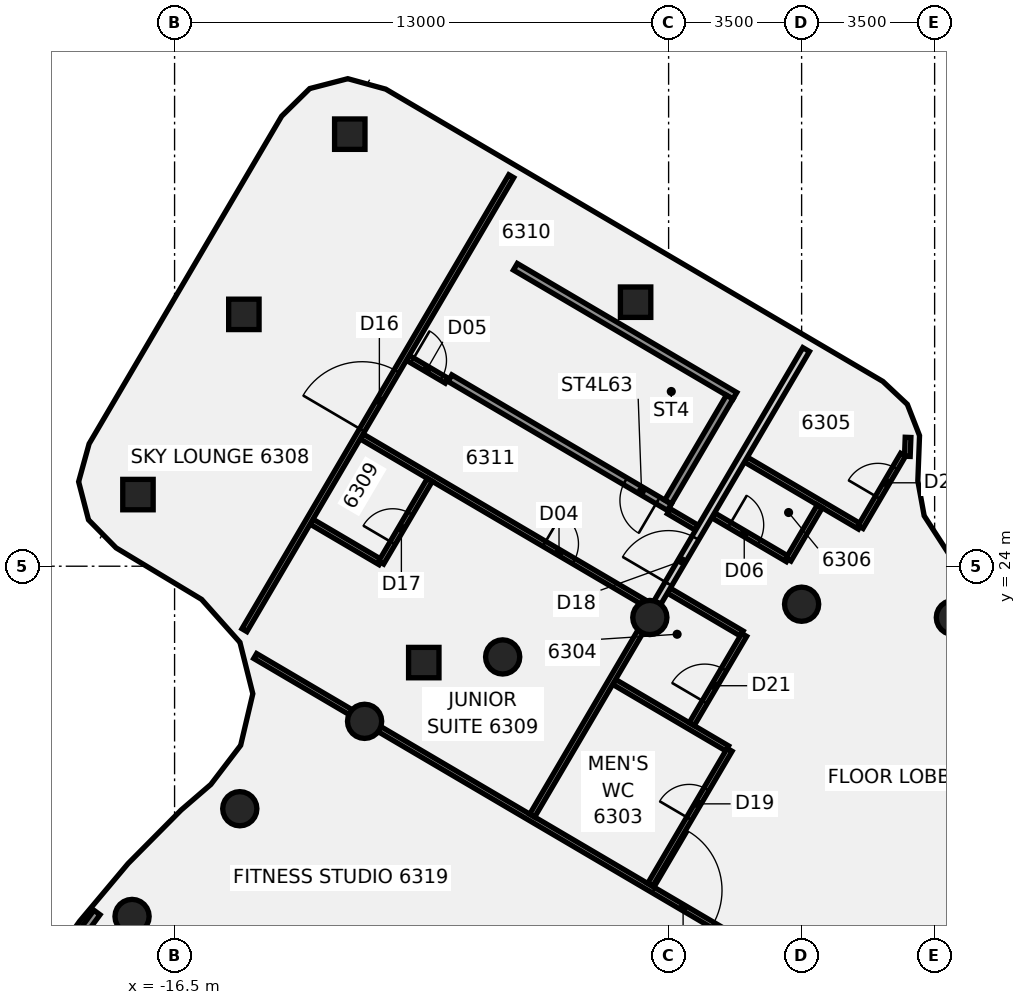
"""IFC4 building model, lengths in metres.
Left out: names, types, materials, properties, quantities, classifications, styles, units other than length and angle.
Written with IfcOpenShell. Run it as: python <this file> out.ifc"""

import sys

from ifc_helpers import new_model, si_unit, direction, frame, frame_2d, origin, origin_2d, place, context, subcontext, project, spatial, polyline, rectangle, circle, outline, extrude, element, fill, save


model = new_model("IFC4")
c1 = context("Model", 3, precision=1e-05, world=origin(), true_north=direction((0.0, 1.0)))
c2 = subcontext(c1, "Body", "Model", "MODEL_VIEW")
j1 = project(units=[si_unit("LENGTHUNIT", "METRE"), si_unit("PLANEANGLEUNIT", "RADIAN")], contexts=[c1])
p1 = place(None, origin())
s1 = spatial("IfcSite", under=j1, at=p1, CompositionType="ELEMENT")
p2 = place(p1, origin())
s2 = spatial("IfcBuilding", under=s1, at=p2, CompositionType="ELEMENT")
p3 = place(p2, frame((0.0, 0.0, 248.7)))
s3 = spatial("IfcBuildingStorey", under=s2, at=p3, CompositionType="ELEMENT", Elevation=248.7)
for number, where, z_axis, x_axis in (
    (1, (3.994, 22.651, -0.14), (0.0, 0.0, 1.0), (1.0, 0.0, 0.0)),
    (2, (0.0, 23.0, -0.14), (0.0, 0.0, 1.0), (1.0, 0.0, 0.0)),
    (3, (-3.994, 22.651, -0.14), (0.0, 0.0, 1.0), (1.0, 0.0, 0.0)),
    (4, (-7.866, 21.613, -0.14), (0.0, 0.0, 1.0), (1.0, 0.0, 0.0)),
    (5, (-11.5, 19.919, -0.14), (0.0, 0.0, 1.0), (1.0, 0.0, 0.0)),
    (6, (-14.784, 17.619, -0.14), (0.0, 0.0, 1.0), (1.0, 0.0, 0.0)),
    (7, (-17.619, 14.784, -0.14), (0.0, 0.0, 1.0), (1.0, 0.0, 0.0)),
):
    element("IfcColumn", number, at=place(p3, frame(where, z_axis=z_axis, x_axis=x_axis)), inside=s3, PredefinedType="COLUMN", context=c2, shape_type="SweptSolid", body=[
        extrude(circle(Radius=0.45, at=origin_2d()), origin(), (0.0, 0.0, 1.0), 3.56),
    ])
for number, where, z_axis, x_axis in (
    (8, (-9.942, 21.464, -0.139), (0.003, -0.051, 0.999), (0.508, 0.861, 0.042)),
    (9, (-4.368, 30.948, -0.139), (-0.046, -0.023, 0.999), (0.861, -0.507, 0.028)),
):
    element("IfcColumn", number, at=place(p3, frame(where, z_axis=z_axis, x_axis=x_axis)), inside=s3, PredefinedType="COLUMN", context=c2, shape_type="SweptSolid", body=[
        extrude(rectangle(XDim=0.8, YDim=0.8, at=origin_2d()), origin(), (0.0, 0.0, 1.0), 3.559),
    ])
p4 = place(p3, frame((-11.89, 35.368, -0.138), z_axis=(0.020708969994, -0.110857918581, 0.993620481094), x_axis=(0.507479159503, 0.857452499838, 0.085088854685)))
e10 = element("IfcColumn", 10, at=p4, inside=s3, PredefinedType="COLUMN", context=c2, shape_type="SweptSolid", body=[
    extrude(rectangle(XDim=0.8, YDim=0.8, at=origin_2d()), origin(), (0.0, 0.0, 1.0), 3.572),
])
p5 = place(p3, frame((-14.677, 30.626, -0.138), z_axis=(0.044850513994, -0.124463584428, 0.991209991649), x_axis=(0.5085121785, 0.856889853507, 0.084588079979)))
e11 = element("IfcColumn", 11, at=p5, inside=s3, PredefinedType="COLUMN", context=c2, shape_type="SweptSolid", body=[
    extrude(rectangle(XDim=0.8, YDim=0.8, at=origin_2d()), origin(), (0.0, 0.0, 1.0), 3.582),
])
p6 = place(p3, frame((-17.464, 25.885, -0.137), z_axis=(0.068808591822, -0.137956811442, 0.988045189183), x_axis=(0.509660839858, 0.85625889674, 0.08406265561)))
e12 = element("IfcColumn", 12, at=p6, inside=s3, PredefinedType="COLUMN", context=c2, shape_type="SweptSolid", body=[
    extrude(rectangle(XDim=0.8, YDim=0.8, at=origin_2d()), origin(), (0.0, 0.0, 1.0), 3.594),
])
p7 = place(p3, frame((-14.379, 21.637, 0.0), z_axis=(0.0, 0.0, 1.0), x_axis=(0.862098659061, -0.506740468134, 0.0)))
e13 = element("IfcWall", 13, at=p7, inside=s3, PredefinedType="PARTITIONING", context=c2, shape_type="SweptSolid", body=[
    extrude(rectangle(XDim=3.129, YDim=0.15, at=frame_2d((1.564, 0.0))), origin(), (0.0, 0.0, 1.0), 2.824),
])
p8 = place(p3, frame((-11.294, 19.823, 0.0), z_axis=(0.0, 0.0, 1.0), x_axis=(0.862088271049, -0.506758140457, 0.0)))
e14 = element("IfcWall", 14, at=p8, inside=s3, PredefinedType="PARTITIONING", context=c2, shape_type="SweptSolid", body=[
    extrude(rectangle(XDim=15.396, YDim=0.15, at=frame_2d((7.698, 0.0))), origin(), (0.0, 0.0, 1.0), 2.824),
])
p9 = place(p8, frame((8.583, 0.0, 0.0)))
e15 = element("IfcOpeningElement", 15, at=p9, cuts=e14, PredefinedType="OPENING", context=c2, shape_type="SweptSolid", body=[
    extrude(rectangle(XDim=1.8, YDim=2.1, at=frame_2d((0.9, 1.05))), frame((0.0, 0.085, 0.0), z_axis=(0.0, -1.0, 0.0), x_axis=(1.0, 0.0, 0.0)), (0.0, 0.0, 1.0), 0.17),
])
p10 = place(p3, frame((-12.896, 25.172, 0.0), z_axis=(0.0, 0.0, 1.0), x_axis=(0.862032569566, -0.506852886948, 0.0)))
e16 = element("IfcWall", 16, at=p10, inside=s3, PredefinedType="PARTITIONING", context=c2, shape_type="SweptSolid", body=[
    extrude(rectangle(XDim=2.105, YDim=0.15, at=frame_2d((1.053, 0.0))), origin(), (0.0, 0.0, 1.0), 2.824),
])
p11 = place(p3, frame((-11.578, 27.414, 0.0), z_axis=(0.0, 0.0, 1.0), x_axis=(0.862113201937, -0.50671572607, 0.0)))
e17 = element("IfcWall", 17, at=p11, inside=s3, PredefinedType="PARTITIONING", context=c2, shape_type="SweptSolid", body=[
    extrude(rectangle(XDim=8.588, YDim=0.15, at=frame_2d((4.294, 0.0))), origin(), (0.0, 0.0, 1.0), 2.82),
])
p12 = place(p11, frame((5.575, 0.0, 0.0)))
e18 = element("IfcOpeningElement", 18, at=p12, cuts=e17, PredefinedType="OPENING", context=c2, shape_type="SweptSolid", body=[
    extrude(rectangle(XDim=0.9, YDim=2.1, at=frame_2d((0.45, 1.05))), frame((0.0, 0.085, 0.0), z_axis=(0.0, -1.0, 0.0), x_axis=(1.0, 0.0, 0.0)), (0.0, 0.0, 1.0), 0.17),
])
p13 = place(p3, frame((-10.362, 29.483, 0.0), z_axis=(0.0, 0.0, 1.0), x_axis=(0.862071765069, -0.506786219102, 0.0)))
e19 = element("IfcWall", 19, at=p13, inside=s3, PredefinedType="PARTITIONING", context=c2, shape_type="SweptSolid", body=[
    extrude(rectangle(XDim=1.186, YDim=0.15, at=frame_2d((0.593, 0.0))), origin(), (0.0, 0.0, 1.0), 2.824),
])
p14 = place(p13, frame((0.136, 0.0, 0.0)))
e20 = element("IfcOpeningElement", 20, at=p14, cuts=e19, PredefinedType="OPENING", context=c2, shape_type="SweptSolid", body=[
    extrude(rectangle(XDim=0.9, YDim=2.1, at=frame_2d((0.45, 1.05))), frame((0.0, 0.085, 0.0), z_axis=(0.0, -1.0, 0.0), x_axis=(1.0, 0.0, 0.0)), (0.0, 0.0, 1.0), 0.17),
])
p15 = place(p3, frame((-3.496, 25.447, 0.0), z_axis=(0.0, 0.0, 1.0), x_axis=(0.862116595813, -0.50670995177, 0.0)))
e21 = element("IfcWall", 21, at=p15, inside=s3, PredefinedType="PARTITIONING", context=c2, shape_type="SweptSolid", body=[
    extrude(rectangle(XDim=0.86, YDim=0.15, at=frame_2d((0.43, 0.0))), origin(), (0.0, 0.0, 1.0), 2.824),
])
p16 = place(p3, frame((-4.934, 20.956, 0.0), z_axis=(0.0, 0.0, 1.0), x_axis=(0.862152421238, -0.506648993439, 0.0)))
e22 = element("IfcWall", 22, at=p16, inside=s3, PredefinedType="PARTITIONING", context=c2, shape_type="SweptSolid", body=[
    extrude(rectangle(XDim=3.45, YDim=0.15, at=frame_2d((1.725, 0.0))), origin(), (0.0, 0.0, 1.0), 2.824),
])
p17 = place(p3, frame((-3.494, 23.357, 0.0), z_axis=(0.0, 0.0, 1.0), x_axis=(0.862114686067, -0.506713201, 0.0)))
e23 = element("IfcWall", 23, at=p17, inside=s3, PredefinedType="PARTITIONING", context=c2, shape_type="SweptSolid", body=[
    extrude(rectangle(XDim=2.225, YDim=0.15, at=frame_2d((1.113, 0.0))), origin(), (0.0, 0.0, 1.0), 2.824),
])
p18 = place(p3, frame((-2.329, 25.34, 0.0), z_axis=(0.0, 0.0, 1.0), x_axis=(0.862115841081, -0.506711235871, 0.0)))
e24 = element("IfcWall", 24, at=p18, inside=s3, PredefinedType="PARTITIONING", context=c2, shape_type="SweptSolid", body=[
    extrude(rectangle(XDim=2.28, YDim=0.15, at=frame_2d((1.14, 0.0))), origin(), (0.0, 0.0, 1.0), 2.824),
])
p19 = place(p18, frame((0.5, 0.0, 0.0)))
e25 = element("IfcOpeningElement", 25, at=p19, cuts=e24, PredefinedType="OPENING", context=c2, shape_type="SweptSolid", body=[
    extrude(rectangle(XDim=0.9, YDim=2.1, at=frame_2d((0.45, 1.05))), frame((0.0, 0.085, 0.0), z_axis=(0.0, -1.0, 0.0), x_axis=(1.0, 0.0, 0.0)), (0.0, 0.0, 1.0), 0.17),
])
p20 = place(p3, frame((-1.467, 26.806, 0.0), z_axis=(0.0, 0.0, 1.0), x_axis=(0.861936018647, -0.507017060619, 0.0)))
e26 = element("IfcWall", 26, at=p20, inside=s3, PredefinedType="PARTITIONING", context=c2, shape_type="SweptSolid", body=[
    extrude(rectangle(XDim=3.48, YDim=0.15, at=frame_2d((1.74, 0.0))), origin(), (0.0, 0.0, 1.0), 2.824),
])
p21 = place(p3, frame((-14.662, 22.317, 0.0), z_axis=(0.0, 0.0, 1.0), x_axis=(0.506732099473, 0.862103578094, 0.0)))
e27 = element("IfcWall", 27, at=p21, inside=s3, PredefinedType="PARTITIONING", context=c2, shape_type="SweptSolid", body=[
    extrude(rectangle(XDim=13.855, YDim=0.15, at=frame_2d((6.928, 0.0))), origin(), (0.0, 0.0, 1.0), 2.82),
])
p22 = place(p21, frame((6.107, 0.0, 0.0)))
e28 = element("IfcOpeningElement", 28, at=p22, cuts=e27, PredefinedType="OPENING", context=c2, shape_type="SweptSolid", body=[
    extrude(rectangle(XDim=1.8, YDim=2.1, at=frame_2d((0.9, 1.05))), frame((0.0, 0.085, 0.0), z_axis=(0.0, -1.0, 0.0), x_axis=(1.0, 0.0, 0.0)), (0.0, 0.0, 1.0), 0.17),
])
p23 = place(p3, frame((-11.064, 24.095, 0.0), z_axis=(0.0, 0.0, 1.0), x_axis=(0.506813115259, 0.862055953057, 0.0)))
e29 = element("IfcWall", 29, at=p23, inside=s3, PredefinedType="PARTITIONING", context=c2, shape_type="SweptSolid", body=[
    extrude(rectangle(XDim=2.526, YDim=0.15, at=frame_2d((1.263, 0.0))), origin(), (0.0, 0.0, 1.0), 2.824),
])
p24 = place(p23, frame((0.6, 0.0, 0.0)))
e30 = element("IfcOpeningElement", 30, at=p24, cuts=e29, PredefinedType="OPENING", context=c2, shape_type="SweptSolid", body=[
    extrude(rectangle(XDim=0.9, YDim=2.1, at=frame_2d((0.45, 1.05))), frame((0.0, 0.085, 0.0), z_axis=(0.0, -1.0, 0.0), x_axis=(1.0, 0.0, 0.0)), (0.0, 0.0, 1.0), 0.17),
])
p25 = place(p3, frame((-7.089, 17.439, 0.0), z_axis=(0.0, 0.0, 1.0), x_axis=(0.506780667638, 0.862075028584, 0.0)))
e31 = element("IfcWall", 31, at=p25, inside=s3, PredefinedType="PARTITIONING", context=c2, shape_type="SweptSolid", body=[
    extrude(rectangle(XDim=5.837, YDim=0.15, at=frame_2d((2.919, 0.0))), origin(), (0.0, 0.0, 1.0), 2.824),
])
p26 = place(p3, frame((-3.903, 22.859, 0.0), z_axis=(0.0, 0.0, 1.0), x_axis=(0.506788872143, 0.862070205419, 0.0)))
e32 = element("IfcWall", 32, at=p26, inside=s3, PredefinedType="PARTITIONING", context=c2, shape_type="SweptSolid", body=[
    extrude(rectangle(XDim=7.936, YDim=0.2, at=frame_2d((3.968, 0.0))), origin(), (0.0, 0.0, 1.0), 2.82),
])
p27 = place(p26, frame((0.787, 0.0, 0.0)))
e33 = element("IfcOpeningElement", 33, at=p27, cuts=e32, PredefinedType="OPENING", context=c2, shape_type="SweptSolid", body=[
    extrude(rectangle(XDim=1.4, YDim=2.1, at=frame_2d((0.7, 1.05))), frame((0.0, 0.11, 0.0), z_axis=(0.0, -1.0, 0.0), x_axis=(1.0, 0.0, 0.0)), (0.0, 0.0, 1.0), 0.22),
])
p28 = place(p3, frame((-3.983, 15.618, 0.0), z_axis=(0.0, 0.0, 1.0), x_axis=(0.50683367945, 0.862043862791, 0.0)))
e34 = element("IfcWall", 34, at=p28, inside=s3, PredefinedType="PARTITIONING", context=c2, shape_type="SweptSolid", body=[
    extrude(rectangle(XDim=4.12, YDim=0.15, at=frame_2d((2.06, 0.0))), origin(), (0.0, 0.0, 1.0), 2.824),
])
p29 = place(p28, frame((2.02, 0.0, 0.0)))
e35 = element("IfcOpeningElement", 35, at=p29, cuts=e34, PredefinedType="OPENING", context=c2, shape_type="SweptSolid", body=[
    extrude(rectangle(XDim=0.9, YDim=2.1, at=frame_2d((0.45, 1.05))), frame((0.0, 0.085, 0.0), z_axis=(0.0, -1.0, 0.0), x_axis=(1.0, 0.0, 0.0)), (0.0, 0.0, 1.0), 0.17),
])
p30 = place(p3, frame((1.551, 25.031, 0.0), z_axis=(0.0, 0.0, 1.0), x_axis=(0.506846086744, 0.862036567874, 0.0)))
e36 = element("IfcWall", 36, at=p30, inside=s3, PredefinedType="PARTITIONING", context=c2, shape_type="SweptSolid", body=[
    extrude(rectangle(XDim=2.207, YDim=0.15, at=frame_2d((1.104, 0.0))), origin(), (0.0, 0.0, 1.0), 2.824),
])
p31 = place(p30, frame((0.9, 0.0, 0.0)))
e37 = element("IfcOpeningElement", 37, at=p31, cuts=e36, PredefinedType="OPENING", context=c2, shape_type="SweptSolid", body=[
    extrude(rectangle(XDim=0.9, YDim=2.1, at=frame_2d((0.45, 1.05))), frame((0.0, 0.085, 0.0), z_axis=(0.0, -1.0, 0.0), x_axis=(1.0, 0.0, 0.0)), (0.0, 0.0, 1.0), 0.17),
])
p32 = place(p3, frame((-2.889, 19.847, 0.0), z_axis=(0.0, 0.0, 1.0), x_axis=(0.506753377111, 0.862091071051, 0.0)))
e38 = element("IfcWall", 38, at=p32, inside=s3, PredefinedType="PARTITIONING", context=c2, shape_type="SweptSolid", body=[
    extrude(rectangle(XDim=2.72, YDim=0.15, at=frame_2d((1.36, 0.0))), origin(), (0.0, 0.0, 1.0), 2.824),
])
p33 = place(p32, frame((0.67, 0.0, 0.0)))
e39 = element("IfcOpeningElement", 39, at=p33, cuts=e38, PredefinedType="OPENING", context=c2, shape_type="SweptSolid", body=[
    extrude(rectangle(XDim=1.0, YDim=2.1, at=frame_2d((0.5, 1.05))), frame((0.0, 0.085, 0.0), z_axis=(0.0, -1.0, 0.0), x_axis=(1.0, 0.0, 0.0)), (0.0, 0.0, 1.0), 0.17),
])
p34 = place(p3, frame((-0.345, 24.175, 0.0), z_axis=(0.0, 0.0, 1.0), x_axis=(0.50671800572, 0.862111862045, 0.0)))
e40 = element("IfcWall", 40, at=p34, inside=s3, PredefinedType="PARTITIONING", context=c2, shape_type="SweptSolid", body=[
    extrude(rectangle(XDim=1.625, YDim=0.15, at=frame_2d((0.812, 0.0))), origin(), (0.0, 0.0, 1.0), 2.824),
])
p35 = place(p3, frame((2.782, 26.891, 0.0), z_axis=(0.0, 0.0, 1.0), x_axis=(0.037607785157, 0.999292577024, 0.0)))
e41 = element("IfcWall", 41, at=p35, inside=s3, PredefinedType="PARTITIONING", context=c2, shape_type="SweptSolid", body=[
    extrude(rectangle(XDim=0.5, YDim=0.15, at=frame_2d((0.25, 0.0))), origin(), (0.0, 0.0, 1.0), 2.824),
])
p36 = place(p3, frame((-18.543, 14.889, 0.0), z_axis=(0.0, 0.0, 1.0), x_axis=(-0.591779327433, -0.806100010931, 0.0)))
e42 = element("IfcWall", 42, at=p36, inside=s3, PredefinedType="SOLIDWALL", context=c2, shape_type="SweptSolid", body=[
    extrude(rectangle(XDim=2.189, YDim=0.2, at=frame_2d((1.095, 0.0))), origin(), (0.0, 0.0, 1.0), 3.42),
])
p37 = place(p3, frame((-3.479, 25.553, -0.14), z_axis=(0.0, 0.0, 1.0), x_axis=(-0.862094350903, 0.506747797371, 0.0)))
e43 = element("IfcWall", 43, at=p37, inside=s3, PredefinedType="SHEAR", context=c2, shape_type="SweptSolid", body=[
    extrude(rectangle(XDim=6.7, YDim=0.2, at=frame_2d((3.35, 0.0))), origin(), (0.0, 0.0, 1.0), 2.96),
])
p38 = place(p37, frame((0.35, 0.0, 0.0)))
e44 = element("IfcOpeningElement", 44, at=p38, cuts=e43, PredefinedType="OPENING", context=c2, shape_type="SweptSolid", body=[
    extrude(rectangle(XDim=1.0, YDim=2.1, at=frame_2d((0.5, 1.05))), frame((0.0, 0.11, 0.0), z_axis=(0.0, -1.0, 0.0), x_axis=(1.0, 0.0, 0.0)), (0.0, 0.0, 1.0), 0.22),
])
p39 = place(p3, frame((-1.757, 28.484, -0.14), z_axis=(0.0, 0.0, 1.0), x_axis=(-0.862094350903, 0.506747797371, 0.0)))
e45 = element("IfcWall", 45, at=p39, inside=s3, PredefinedType="SHEAR", context=c2, shape_type="SweptSolid", body=[
    extrude(rectangle(XDim=6.7, YDim=0.2, at=frame_2d((3.35, 0.0))), origin(), (0.0, 0.0, 1.0), 2.96),
])
p40 = place(p3, frame((-1.893, 28.449, -0.14), z_axis=(0.0, 0.0, 1.0), x_axis=(-0.506733365032, -0.862102834216, 0.0)))
e46 = element("IfcWall", 46, at=p40, inside=s3, PredefinedType="SHEAR", context=c2, shape_type="SweptSolid", body=[
    extrude(rectangle(XDim=3.2, YDim=0.2, at=frame_2d((1.6, 0.0))), origin(), (0.0, 0.0, 1.0), 3.56),
])
p41 = place(p3, frame((0.0, 0.0, -0.14)))
e47 = element("IfcWall", 47, at=p41, inside=s3, PredefinedType="SHEAR", context=c2, shape_type="SweptSolid", body=[
    extrude(outline(polyline([(-7.411, 31.692), (-7.583, 31.793), (-9.205, 29.034), (-9.032, 28.933), (-7.411, 31.692)])), origin(), (0.0, 0.0, 1.0), 3.56),
])
p42 = place(p9, frame((1.8, 0.0, 0.0), z_axis=(0.0, 0.0, 1.0), x_axis=(-1.0, 0.0, 0.0)))
e48 = element("IfcDoor", 48, at=p42, inside=s3, OperationType="DOUBLE_DOOR_SINGLE_SWING", PredefinedType="DOOR", context=c2, shape_type="SweptSolid", body=[
    extrude(rectangle(XDim=1.8, YDim=2.1, at=frame_2d((0.9, 1.05))), frame((0.0, 0.025, 0.0), z_axis=(0.0, -1.0, 0.0), x_axis=(1.0, 0.0, 0.0)), (0.0, 0.0, 1.0), 0.05),
])
fill(e15, e48)
p43 = place(p12, frame((0.9, 0.0, 0.0), z_axis=(0.0, 0.0, 1.0), x_axis=(-1.0, 0.0, 0.0)))
e49 = element("IfcDoor", 49, at=p43, inside=s3, OperationType="SINGLE_SWING_RIGHT", PredefinedType="DOOR", context=c2, shape_type="SweptSolid", body=[
    extrude(rectangle(XDim=0.9, YDim=2.1, at=frame_2d((0.45, 1.05))), frame((0.0, 0.025, 0.0), z_axis=(0.0, -1.0, 0.0), x_axis=(1.0, 0.0, 0.0)), (0.0, 0.0, 1.0), 0.05),
])
fill(e18, e49)
p44 = place(p14, origin())
e50 = element("IfcDoor", 50, at=p44, inside=s3, OperationType="SINGLE_SWING_RIGHT", PredefinedType="DOOR", context=c2, shape_type="SweptSolid", body=[
    extrude(rectangle(XDim=0.9, YDim=2.1, at=frame_2d((0.45, 1.05))), frame((0.0, 0.025, 0.0), z_axis=(0.0, -1.0, 0.0), x_axis=(1.0, 0.0, 0.0)), (0.0, 0.0, 1.0), 0.05),
])
fill(e20, e50)
p45 = place(p19, origin())
e51 = element("IfcDoor", 51, at=p45, inside=s3, OperationType="SINGLE_SWING_RIGHT", PredefinedType="DOOR", context=c2, shape_type="SweptSolid", body=[
    extrude(rectangle(XDim=0.9, YDim=2.1, at=frame_2d((0.45, 1.05))), frame((0.0, 0.025, 0.0), z_axis=(0.0, -1.0, 0.0), x_axis=(1.0, 0.0, 0.0)), (0.0, 0.0, 1.0), 0.05),
])
fill(e25, e51)
p46 = place(p22, origin())
e52 = element("IfcDoor", 52, at=p46, inside=s3, OperationType="DOUBLE_DOOR_SINGLE_SWING", PredefinedType="DOOR", context=c2, shape_type="SweptSolid", body=[
    extrude(rectangle(XDim=1.8, YDim=2.1, at=frame_2d((0.9, 1.05))), frame((0.0, 0.025, 0.0), z_axis=(0.0, -1.0, 0.0), x_axis=(1.0, 0.0, 0.0)), (0.0, 0.0, 1.0), 0.05),
])
fill(e28, e52)
p47 = place(p24, origin())
e53 = element("IfcDoor", 53, at=p47, inside=s3, OperationType="SINGLE_SWING_RIGHT", PredefinedType="DOOR", context=c2, shape_type="SweptSolid", body=[
    extrude(rectangle(XDim=0.9, YDim=2.1, at=frame_2d((0.45, 1.05))), frame((0.0, 0.025, 0.0), z_axis=(0.0, -1.0, 0.0), x_axis=(1.0, 0.0, 0.0)), (0.0, 0.0, 1.0), 0.05),
])
fill(e30, e53)
p48 = place(p27, frame((1.4, 0.0, 0.0), z_axis=(0.0, 0.0, 1.0), x_axis=(-1.0, 0.0, 0.0)))
e54 = element("IfcDoor", 54, at=p48, inside=s3, OperationType="DOUBLE_DOOR_SINGLE_SWING", PredefinedType="DOOR", context=c2, shape_type="SweptSolid", body=[
    extrude(rectangle(XDim=1.4, YDim=2.1, at=frame_2d((0.7, 1.05))), frame((0.0, 0.025, 0.0), z_axis=(0.0, -1.0, 0.0), x_axis=(1.0, 0.0, 0.0)), (0.0, 0.0, 1.0), 0.05),
])
fill(e33, e54)
p49 = place(p29, origin())
e55 = element("IfcDoor", 55, at=p49, inside=s3, OperationType="SINGLE_SWING_LEFT", PredefinedType="DOOR", context=c2, shape_type="SweptSolid", body=[
    extrude(rectangle(XDim=0.9, YDim=2.1, at=frame_2d((0.45, 1.05))), frame((0.0, 0.025, 0.0), z_axis=(0.0, -1.0, 0.0), x_axis=(1.0, 0.0, 0.0)), (0.0, 0.0, 1.0), 0.05),
])
fill(e35, e55)
p50 = place(p31, origin())
e56 = element("IfcDoor", 56, at=p50, inside=s3, OperationType="SINGLE_SWING_LEFT", PredefinedType="DOOR", context=c2, shape_type="SweptSolid", body=[
    extrude(rectangle(XDim=0.9, YDim=2.1, at=frame_2d((0.45, 1.05))), frame((0.0, 0.025, 0.0), z_axis=(0.0, -1.0, 0.0), x_axis=(1.0, 0.0, 0.0)), (0.0, 0.0, 1.0), 0.05),
])
fill(e37, e56)
p51 = place(p33, origin())
e57 = element("IfcDoor", 57, at=p51, inside=s3, OperationType="SINGLE_SWING_RIGHT", PredefinedType="DOOR", context=c2, shape_type="SweptSolid", body=[
    extrude(rectangle(XDim=1.0, YDim=2.1, at=frame_2d((0.5, 1.05))), frame((0.0, 0.025, 0.0), z_axis=(0.0, -1.0, 0.0), x_axis=(1.0, 0.0, 0.0)), (0.0, 0.0, 1.0), 0.05),
])
fill(e39, e57)
p52 = place(p38, origin())
e58 = element("IfcDoor", 58, at=p52, inside=s3, OperationType="SINGLE_SWING_LEFT", PredefinedType="DOOR", context=c2, shape_type="SweptSolid", body=[
    extrude(rectangle(XDim=1.0, YDim=2.1, at=frame_2d((0.5, 1.05))), frame((0.0, 0.025, 0.0), z_axis=(0.0, -1.0, 0.0), x_axis=(1.0, 0.0, 0.0)), (0.0, 0.0, 1.0), 0.05),
])
fill(e44, e58)
save(model, sys.argv[1])
